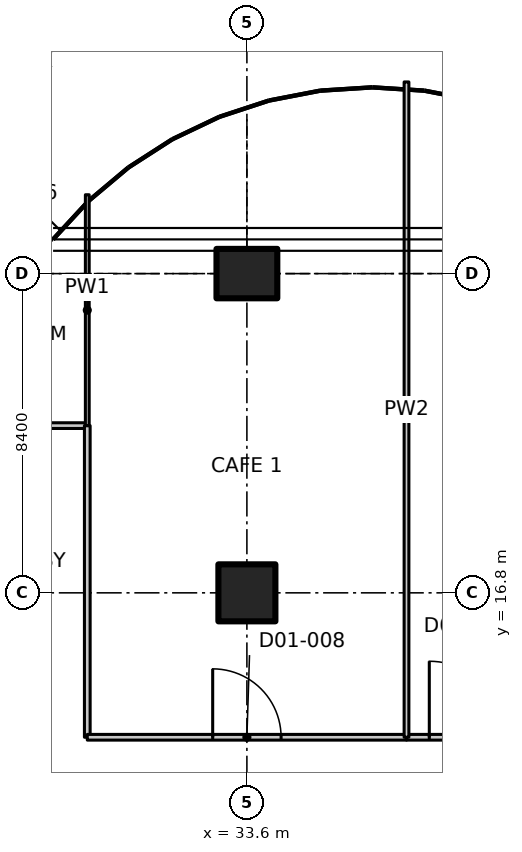
"""IFC4 building model, lengths in metres.
Left out: names, types, materials, properties, quantities, classifications, styles, units other than length and angle.
Written with IfcOpenShell. Run it as: python <this file> out.ifc"""

import sys

from ifc_helpers import new_model, si_unit, direction, frame, frame_2d, origin, origin_2d, place, context, subcontext, project, spatial, polyline, rectangle, outline, extrude, element, fill, save


model = new_model("IFC4")
c1 = context("Model", 3, precision=1e-05, world=origin(), true_north=direction((0.0, 1.0)))
c2 = subcontext(c1, "Body", "Model", "MODEL_VIEW")
j1 = project(units=[si_unit("LENGTHUNIT", "METRE"), si_unit("PLANEANGLEUNIT", "RADIAN")], contexts=[c1])
p1 = place(None, origin())
s1 = spatial("IfcSite", under=j1, at=p1, CompositionType="ELEMENT")
p2 = place(p1, origin())
s2 = spatial("IfcBuilding", under=s1, at=p2, CompositionType="ELEMENT")
p3 = place(p2, origin())
s3 = spatial("IfcBuildingStorey", under=s2, at=p3, CompositionType="ELEMENT", Elevation=0.0)
p4 = place(p3, frame((33.6, 16.8, 0.0), z_axis=(0.0, 0.0, 1.0), x_axis=(1.0, 0.0, 0.0)))
e1 = element("IfcColumn", 1, at=p4, inside=s3, PredefinedType="COLUMN", context=c2, shape_type="SweptSolid", body=[
    extrude(rectangle(XDim=1.5, YDim=1.5, at=origin_2d()), origin(), (0.0, 0.0, 1.0), 6.75),
])
p5 = place(p3, frame((33.6, 25.2, 0.0), z_axis=(0.0, 0.0, 1.0), x_axis=(0.0, 1.0, 0.0)))
e2 = element("IfcColumn", 2, at=p5, inside=s3, PredefinedType="COLUMN", context=c2, shape_type="SweptSolid", body=[
    extrude(rectangle(XDim=1.3, YDim=1.6, at=origin_2d()), origin(), (0.0, 0.0, 1.0), 6.75),
])
p6 = place(p3, frame((30.8, 42.0, 0.0), z_axis=(1.0, 0.0, 0.0), x_axis=(0.0, 1.0, 0.0)))
e3 = element("IfcWall", 3, at=p6, inside=s3, PredefinedType="SOLIDWALL", context=c2, shape_type="SweptSolid", body=[
    extrude(outline(polyline([(13.304, 32.111), (13.636, 31.229), (13.909, 30.327), (14.123, 29.409), (14.277, 28.479), (14.369, 27.542), (14.4, 26.6), (14.4, 0.0), (8.4, 0.0), (8.4, 26.6), (8.382, 27.149), (8.328, 27.696), (8.239, 28.239), (8.114, 28.774), (7.954, 29.3), (7.76, 29.814), (7.534, 30.315), (7.275, 30.8), (6.984, 31.267), (6.664, 31.714), (6.315, 32.138), (5.94, 32.54), (5.539, 32.915), (5.114, 33.264), (4.667, 33.584), (4.2, 33.875), (3.715, 34.134), (3.215, 34.361), (2.7, 34.554), (2.174, 34.714), (1.639, 34.839), (1.096, 34.928), (0.549, 34.982), (0.0, 35.0), (-0.549, 34.982), (-1.096, 34.928), (-1.639, 34.839), (-2.174, 34.714), (-2.7, 34.554), (-3.215, 34.361), (-3.715, 34.134), (-4.2, 33.875), (-4.667, 33.584), (-5.114, 33.264), (-5.539, 32.915), (-5.94, 32.54), (-6.315, 32.138), (-6.664, 31.714), (-6.984, 31.267), (-7.275, 30.8), (-7.534, 30.315), (-7.76, 29.814), (-7.954, 29.3), (-8.114, 28.774), (-8.239, 28.239), (-8.328, 27.696), (-8.382, 27.149), (-8.4, 26.6), (-8.4, 0.0), (-14.4, 0.0), (-14.4, 26.6), (-14.369, 27.542), (-14.277, 28.479), (-14.123, 29.409), (-13.909, 30.327), (-13.636, 31.229), (-13.304, 32.111), (-13.241, 32.25), (-10.8, 32.25), (-10.8, 36.123), (-10.182, 36.782), (-9.495, 37.427), (-8.766, 38.024), (-8.0, 38.573), (-7.2, 39.071), (-6.369, 39.515), (-5.51, 39.904), (-4.629, 40.236), (-3.727, 40.509), (-2.809, 40.723), (-1.88, 40.877), (-0.942, 40.969), (0.0, 41.0), (0.942, 40.969), (1.88, 40.877), (2.809, 40.723), (3.727, 40.509), (4.629, 40.236), (5.51, 39.904), (6.369, 39.515), (7.2, 39.071), (8.0, 38.573), (8.766, 38.024), (9.495, 37.427), (10.182, 36.782), (10.8, 36.123), (10.8, 32.25), (13.241, 32.25), (13.304, 32.111)])), origin(), (0.0, 0.0, 1.0), 2.6),
])
p7 = place(p3, frame((25.2, 21.2, 0.0), z_axis=(0.0, 0.0, 1.0), x_axis=(1.0, 0.0, 0.0)))
e4 = element("IfcWall", 4, at=p7, inside=s3, PredefinedType="PARTITIONING", context=c2, shape_type="SweptSolid", body=[
    extrude(rectangle(XDim=4.2, YDim=0.15, at=frame_2d((2.1, 0.0))), origin(), (0.0, 0.0, 1.0), 6.73),
])
p8 = place(p3, frame((29.4, 21.2, 0.0), z_axis=(0.0, 0.0, 1.0), x_axis=(0.0, -1.0, 0.0)))
e5 = element("IfcWall", 5, at=p8, inside=s3, PredefinedType="PARTITIONING", context=c2, shape_type="SweptSolid", body=[
    extrude(rectangle(XDim=8.2, YDim=0.15, at=frame_2d((4.1, 0.0))), origin(), (0.0, 0.0, 1.0), 6.73),
])
p9 = place(p3, frame((29.4, 27.275, 0.0), z_axis=(0.0, 0.0, 1.0), x_axis=(0.0, -1.0, 0.0)))
e6 = element("IfcWall", 6, at=p9, inside=s3, PredefinedType="PARTITIONING", context=c2, shape_type="SweptSolid", body=[
    extrude(outline(polyline([(0.0, 0.0), (6.075, 0.0), (6.075, 6.73), (2.525, 6.73), (2.523, 6.38), (1.627, 6.38), (1.625, 6.73), (0.0, 6.73), (0.0, 0.0)])), frame((0.0, 0.05, 0.0), z_axis=(0.0, -1.0, 0.0), x_axis=(1.0, 0.0, 0.0)), (0.0, 0.0, 1.0), 0.1),
])
p10 = place(p3, frame((28.432, 31.168, 0.0), z_axis=(0.0, 0.0, 1.0), x_axis=(-0.540854867502, -0.841115932734, 0.0)))
e7 = element("IfcWall", 7, at=p10, inside=s3, PredefinedType="PARTITIONING", context=c2, shape_type="SweptSolid", body=[
    extrude(rectangle(XDim=1.015, YDim=0.15, at=frame_2d((0.507, 0.0))), origin(), (0.0, 0.0, 1.0), 6.73),
])
p11 = place(p3, frame((29.4, 13.0, 0.0), z_axis=(0.0, 0.0, 1.0), x_axis=(1.0, 0.0, 0.0)))
e8 = element("IfcWall", 8, at=p11, inside=s3, PredefinedType="PARTITIONING", context=c2, shape_type="SweptSolid", body=[
    extrude(rectangle(XDim=8.4, YDim=0.15, at=frame_2d((4.2, 0.0))), origin(), (0.0, 0.0, 1.0), 6.73),
])
p12 = place(p11, frame((3.3, 0.0, 0.0)))
e9 = element("IfcOpeningElement", 9, at=p12, cuts=e8, PredefinedType="OPENING", context=c2, shape_type="SweptSolid", body=[
    extrude(rectangle(XDim=1.8, YDim=2.1, at=frame_2d((0.9, 1.05))), frame((0.0, 0.085, 0.0), z_axis=(0.0, -1.0, 0.0), x_axis=(1.0, 0.0, 0.0)), (0.0, 0.0, 1.0), 0.17),
])
p13 = place(p3, frame((37.8, 13.0, 0.0), z_axis=(0.0, 0.0, 1.0), x_axis=(1.0, 0.0, 0.0)))
e10 = element("IfcWall", 10, at=p13, inside=s3, PredefinedType="PARTITIONING", context=c2, shape_type="SweptSolid", body=[
    extrude(rectangle(XDim=3.4, YDim=0.15, at=frame_2d((1.7, 0.0))), origin(), (0.0, 0.0, 1.0), 6.73),
])
p14 = place(p13, frame((0.6, 0.0, 0.0)))
e11 = element("IfcOpeningElement", 11, at=p14, cuts=e10, PredefinedType="OPENING", context=c2, shape_type="SweptSolid", body=[
    extrude(rectangle(XDim=2.0, YDim=2.4, at=frame_2d((1.0, 1.2))), frame((0.0, 0.085, 0.0), z_axis=(0.0, -1.0, 0.0), x_axis=(1.0, 0.0, 0.0)), (0.0, 0.0, 1.0), 0.17),
])
p15 = place(p3, frame((37.8, 30.243, 0.0), z_axis=(0.0, 0.0, 1.0), x_axis=(0.0, -1.0, 0.0)))
e12 = element("IfcWall", 12, at=p15, inside=s3, PredefinedType="PARTITIONING", context=c2, shape_type="SweptSolid", body=[
    extrude(outline(polyline([(0.0, 0.0), (17.243, 0.0), (17.243, 6.73), (5.493, 6.73), (5.491, 6.38), (4.595, 6.38), (4.593, 6.73), (0.0, 6.73), (0.0, 0.0)])), frame((0.0, 0.062, 0.0), z_axis=(0.0, -1.0, 0.0), x_axis=(1.0, 0.0, 0.0)), (0.0, 0.0, 1.0), 0.125),
])
p16 = place(p12, origin())
e13 = element("IfcDoor", 13, at=p16, inside=s3, OperationType="DOUBLE_DOOR_SINGLE_SWING", PredefinedType="DOOR", context=c2, shape_type="SweptSolid", body=[
    extrude(rectangle(XDim=1.8, YDim=2.1, at=frame_2d((0.9, 1.05))), frame((0.0, 0.025, 0.0), z_axis=(0.0, -1.0, 0.0), x_axis=(1.0, 0.0, 0.0)), (0.0, 0.0, 1.0), 0.05),
])
fill(e9, e13)
p17 = place(p14, origin())
e14 = element("IfcDoor", 14, at=p17, inside=s3, OperationType="DOUBLE_DOOR_SINGLE_SWING", PredefinedType="DOOR", context=c2, shape_type="SweptSolid", body=[
    extrude(rectangle(XDim=2.0, YDim=2.4, at=frame_2d((1.0, 1.2))), frame((0.0, 0.025, 0.0), z_axis=(0.0, -1.0, 0.0), x_axis=(1.0, 0.0, 0.0)), (0.0, 0.0, 1.0), 0.05),
])
fill(e11, e14)
save(model, sys.argv[1])
